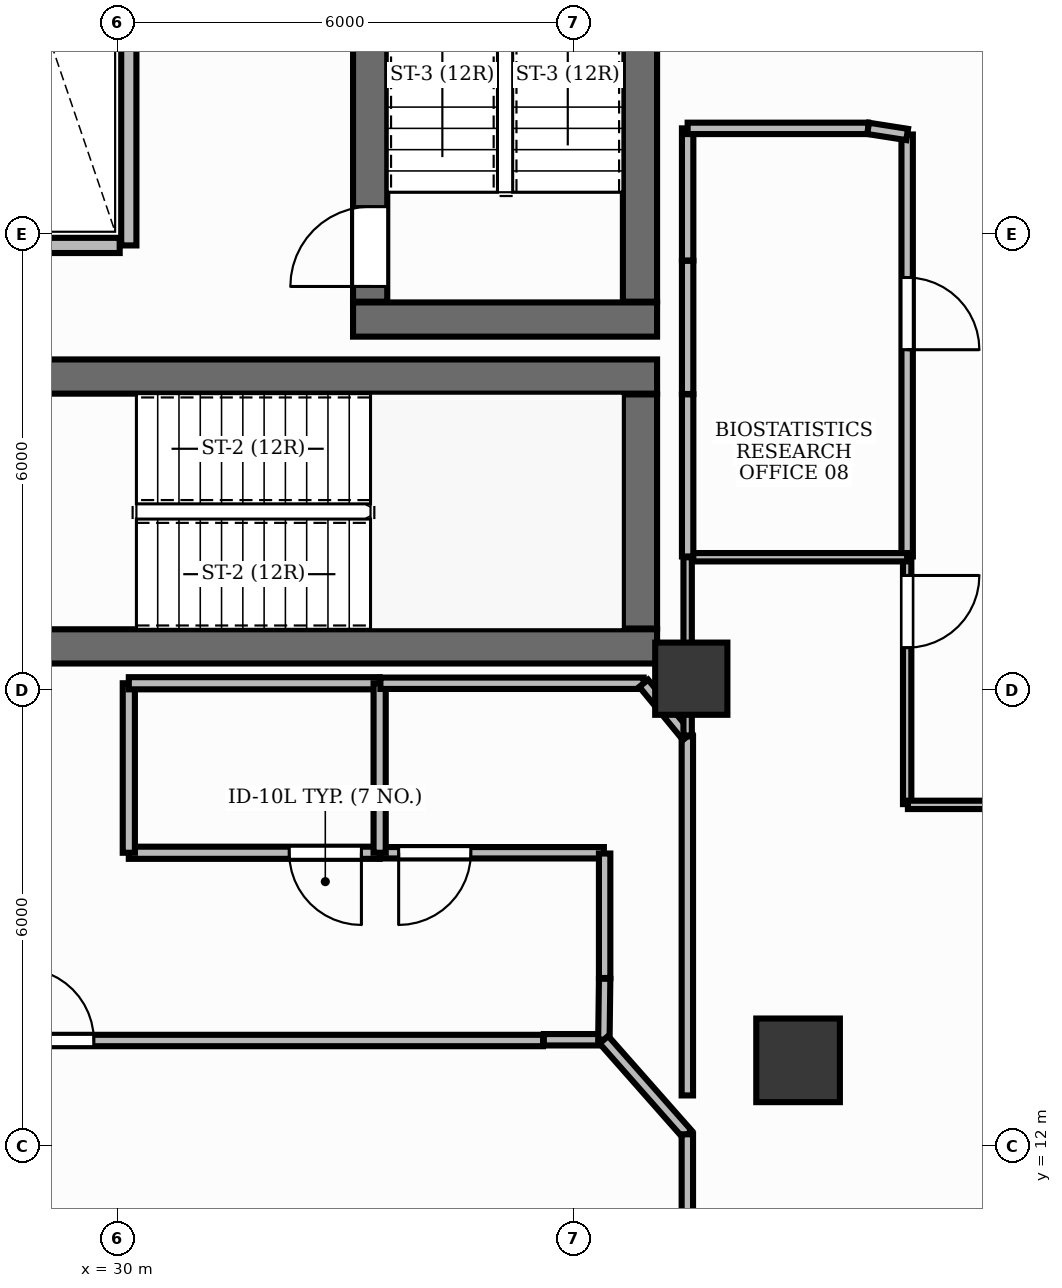
"""IFC4 building model, lengths in metres.
Left out: names, types, materials, properties, quantities, classifications, styles, units other than length and angle.
Written with IfcOpenShell. Run it as: python <this file> out.ifc"""

import sys

from ifc_helpers import new_model, si_unit, direction, frame, frame_2d, origin, origin_2d, place, context, subcontext, project, spatial, rectangle, extrude, element, fill, save


model = new_model("IFC4")
c1 = context("Model", 3, precision=1e-05, world=origin(), true_north=direction((0.0, 1.0)))
c2 = subcontext(c1, "Body", "Model", "MODEL_VIEW")
j1 = project(units=[si_unit("LENGTHUNIT", "METRE"), si_unit("PLANEANGLEUNIT", "RADIAN")], contexts=[c1])
p1 = place(None, origin())
s1 = spatial("IfcSite", under=j1, at=p1, CompositionType="ELEMENT")
p2 = place(p1, origin())
s2 = spatial("IfcBuilding", under=s1, at=p2, CompositionType="ELEMENT")
p3 = place(p2, frame((0.0, 0.0, 115.2)))
s3 = spatial("IfcBuildingStorey", under=s2, at=p3, CompositionType="ELEMENT", Elevation=115.2)
p4 = place(p3, frame((28.852, 18.575, 0.0), z_axis=(0.0, 0.0, 1.0), x_axis=(1.0, 0.0, 0.0)))
e1 = element("IfcWall", 1, at=p4, inside=s3, PredefinedType="SHEAR", context=c2, shape_type="SweptSolid", body=[
    extrude(rectangle(XDim=8.248, YDim=0.45, at=frame_2d((4.124, 0.0))), origin(), (0.0, 0.0, 1.0), 3.9),
])
p5 = place(p3, frame((28.35, 22.125, 0.0), z_axis=(0.0, 0.0, 1.0), x_axis=(1.0, 0.0, 0.0)))
e2 = element("IfcWall", 2, at=p5, inside=s3, PredefinedType="SHEAR", context=c2, shape_type="SweptSolid", body=[
    extrude(rectangle(XDim=8.75, YDim=0.45, at=frame_2d((4.375, 0.0))), origin(), (0.0, 0.0, 1.0), 3.9),
])
p6 = place(p3, frame((36.875, 18.81, 0.0), z_axis=(0.0, 0.0, 1.0), x_axis=(0.0, 1.0, 0.0)))
e3 = element("IfcWall", 3, at=p6, inside=s3, PredefinedType="SHEAR", context=c2, shape_type="SweptSolid", body=[
    extrude(rectangle(XDim=3.08, YDim=0.45, at=frame_2d((1.54, 0.0))), origin(), (0.0, 0.0, 1.0), 3.9),
])
p7 = place(p3, frame((33.1, 22.875, 0.0), z_axis=(0.0, 0.0, 1.0), x_axis=(1.0, 0.0, 0.0)))
e4 = element("IfcWall", 4, at=p7, inside=s3, PredefinedType="SHEAR", context=c2, shape_type="SweptSolid", body=[
    extrude(rectangle(XDim=4.0, YDim=0.45, at=frame_2d((2.0, 0.0))), origin(), (0.0, 0.0, 1.0), 3.9),
])
p8 = place(p3, frame((36.875, 23.11, 0.0), z_axis=(0.0, 0.0, 1.0), x_axis=(0.0, 1.0, 0.0)))
e5 = element("IfcWall", 5, at=p8, inside=s3, PredefinedType="SHEAR", context=c2, shape_type="SweptSolid", body=[
    extrude(rectangle(XDim=7.78, YDim=0.45, at=frame_2d((3.89, 0.0))), origin(), (0.0, 0.0, 1.0), 3.9),
])
p9 = place(p3, frame((33.325, 23.11, 0.0), z_axis=(0.0, 0.0, 1.0), x_axis=(0.0, 1.0, 0.0)))
e6 = element("IfcWall", 6, at=p9, inside=s3, PredefinedType="SHEAR", context=c2, shape_type="SweptSolid", body=[
    extrude(rectangle(XDim=7.78, YDim=0.45, at=frame_2d((3.89, 0.0))), origin(), (0.0, 0.0, 1.0), 3.9),
])
p10 = place(p9, frame((0.2, 0.0, 0.0)))
e7 = element("IfcOpeningElement", 7, at=p10, cuts=e6, PredefinedType="OPENING", context=c2, shape_type="SweptSolid", body=[
    extrude(rectangle(XDim=1.05, YDim=2.15, at=frame_2d((0.525, 1.075))), frame((0.0, 0.24, 0.0), z_axis=(0.0, -1.0, 0.0), x_axis=(1.0, 0.0, 0.0)), (0.0, 0.0, 1.0), 0.48),
])
p11 = place(p3, frame((37.55, 18.15, -0.0), z_axis=(0.0, 0.0, 1.0), x_axis=(1.0, 0.0, 0.0)))
e8 = element("IfcColumn", 8, at=p11, inside=s3, PredefinedType="PILASTER", context=c2, shape_type="SweptSolid", body=[
    extrude(rectangle(XDim=0.95, YDim=0.95, at=origin_2d()), origin(), (0.0, 0.0, 1.0), 3.901),
])
p12 = place(p3, frame((38.955, 13.129, -0.0), z_axis=(0.0, 0.0, 1.0), x_axis=(1.0, 0.0, 0.0)))
e9 = element("IfcColumn", 9, at=p12, inside=s3, PredefinedType="COLUMN", context=c2, shape_type="SweptSolid", body=[
    extrude(rectangle(XDim=1.1, YDim=1.1, at=origin_2d()), origin(), (0.0, 0.0, 1.0), 3.901),
])
p13 = place(p3, frame((30.15, 23.85, 0.0), z_axis=(0.0, 0.0, 1.0), x_axis=(0.0, 1.0, 0.0)))
e10 = element("IfcWall", 10, at=p13, inside=s3, PredefinedType="PARTITIONING", context=c2, shape_type="SweptSolid", body=[
    extrude(rectangle(XDim=6.35, YDim=0.2, at=frame_2d((3.175, 0.0))), origin(), (0.0, 0.0, 1.0), 2.91),
])
p14 = place(p3, frame((27.934, 23.85, 0.0), z_axis=(0.0, 0.0, 1.0), x_axis=(1.0, 0.0, 0.0)))
e11 = element("IfcWall", 11, at=p14, inside=s3, PredefinedType="PARTITIONING", context=c2, shape_type="SweptSolid", body=[
    extrude(rectangle(XDim=2.096, YDim=0.2, at=frame_2d((1.048, 0.0))), origin(), (0.0, 0.0, 1.0), 2.91),
])
p15 = place(p3, frame((33.45, 15.86, 0.0), z_axis=(0.0, 0.0, 1.0), x_axis=(-1.0, 0.0, 0.0)))
e12 = element("IfcWall", 12, at=p15, inside=s3, PredefinedType="PARTITIONING", context=c2, shape_type="SweptSolid", body=[
    extrude(rectangle(XDim=3.3, YDim=0.16, at=frame_2d((1.65, 0.0))), origin(), (0.0, 0.0, 1.0), 2.91),
])
p16 = place(p15, frame((0.24, 0.0, 0.0)))
e13 = element("IfcOpeningElement", 13, at=p16, cuts=e12, PredefinedType="OPENING", context=c2, shape_type="SweptSolid", body=[
    extrude(rectangle(XDim=0.95, YDim=2.15, at=frame_2d((0.475, 1.075))), frame((0.0, 0.095, 0.0), z_axis=(0.0, -1.0, 0.0), x_axis=(1.0, 0.0, 0.0)), (0.0, 0.0, 1.0), 0.19),
])
p17 = place(p3, frame((28.5, 13.39, 0.0), z_axis=(0.0, 0.0, 1.0), x_axis=(1.0, 0.0, 0.0)))
e14 = element("IfcWall", 14, at=p17, inside=s3, PredefinedType="PARTITIONING", context=c2, shape_type="SweptSolid", body=[
    extrude(rectangle(XDim=7.1, YDim=0.15, at=frame_2d((3.55, 0.0))), origin(), (0.0, 0.0, 1.0), 2.91),
])
p18 = place(p17, frame((0.24, 0.0, 0.0)))
e15 = element("IfcOpeningElement", 15, at=p18, cuts=e14, PredefinedType="OPENING", context=c2, shape_type="SweptSolid", body=[
    extrude(rectangle(XDim=0.95, YDim=2.15, at=frame_2d((0.475, 1.075))), frame((0.0, 0.09, 0.0), z_axis=(0.0, -1.0, 0.0), x_axis=(1.0, 0.0, 0.0)), (0.0, 0.0, 1.0), 0.18),
])
p19 = place(p3, frame((36.4, 15.86, 0.0), z_axis=(0.0, 0.0, 1.0), x_axis=(-1.0, 0.0, 0.0)))
e16 = element("IfcWall", 16, at=p19, inside=s3, PredefinedType="PARTITIONING", context=c2, shape_type="SweptSolid", body=[
    extrude(rectangle(XDim=2.94, YDim=0.15, at=frame_2d((1.47, 0.0))), origin(), (0.0, 0.0, 1.0), 2.91),
])
p20 = place(p19, frame((1.75, 0.0, 0.0)))
e17 = element("IfcOpeningElement", 17, at=p20, cuts=e16, PredefinedType="OPENING", context=c2, shape_type="SweptSolid", body=[
    extrude(rectangle(XDim=0.95, YDim=2.15, at=frame_2d((0.475, 1.075))), frame((0.0, 0.09, 0.0), z_axis=(0.0, -1.0, 0.0), x_axis=(1.0, 0.0, 0.0)), (0.0, 0.0, 1.0), 0.18),
])
p21 = place(p3, frame((40.39, 19.748, 0.0), z_axis=(0.0, 0.0, 1.0), x_axis=(0.0, -1.0, 0.0)))
e18 = element("IfcWall", 18, at=p21, inside=s3, PredefinedType="MOVABLE", context=c2, shape_type="SweptSolid", body=[
    extrude(rectangle(XDim=3.248, YDim=0.11, at=frame_2d((1.624, 0.0))), origin(), (0.0, 0.0, 1.0), 2.91),
])
p22 = place(p21, frame((0.24, 0.0, 0.0)))
e19 = element("IfcOpeningElement", 19, at=p22, cuts=e18, PredefinedType="OPENING", context=c2, shape_type="SweptSolid", body=[
    extrude(rectangle(XDim=0.95, YDim=2.15, at=frame_2d((0.475, 1.075))), frame((0.0, 0.07, 0.0), z_axis=(0.0, -1.0, 0.0), x_axis=(1.0, 0.0, 0.0)), (0.0, 0.0, 1.0), 0.14),
])
p23 = place(p3, frame((40.39, 25.31, 0.0), z_axis=(0.0, 0.0, 1.0), x_axis=(0.0, -1.0, 0.0)))
e20 = element("IfcWall", 20, at=p23, inside=s3, PredefinedType="PARTITIONING", context=c2, shape_type="SweptSolid", body=[
    extrude(rectangle(XDim=5.552, YDim=0.15, at=frame_2d((2.776, 0.0))), origin(), (0.0, 0.0, 1.0), 2.91),
])
p24 = place(p23, frame((1.882, 0.0, 0.0)))
e21 = element("IfcOpeningElement", 21, at=p24, cuts=e20, PredefinedType="OPENING", context=c2, shape_type="SweptSolid", body=[
    extrude(rectangle(XDim=0.95, YDim=2.15, at=frame_2d((0.475, 1.075))), frame((0.0, 0.09, 0.0), z_axis=(0.0, -1.0, 0.0), x_axis=(1.0, 0.0, 0.0)), (0.0, 0.0, 1.0), 0.18),
])
p25 = place(p3, frame((30.15, 15.86, 0.0), z_axis=(0.0, 0.0, 1.0), x_axis=(0.0, 1.0, 0.0)))
e22 = element("IfcWall", 22, at=p25, inside=s3, PredefinedType="PARTITIONING", context=c2, shape_type="SweptSolid", body=[
    extrude(rectangle(XDim=2.23, YDim=0.16, at=frame_2d((1.115, 0.0))), origin(), (0.0, 0.0, 1.0), 2.91),
])
p26 = place(p3, frame((30.15, 18.09, 0.0), z_axis=(0.0, 0.0, 1.0), x_axis=(1.0, 0.0, 0.0)))
e23 = element("IfcWall", 23, at=p26, inside=s3, PredefinedType="PARTITIONING", context=c2, shape_type="SweptSolid", body=[
    extrude(rectangle(XDim=3.3, YDim=0.16, at=frame_2d((1.65, 0.0))), origin(), (0.0, 0.0, 1.0), 2.91),
])
p27 = place(p3, frame((33.45, 18.09, 0.0), z_axis=(0.0, 0.0, 1.0), x_axis=(0.0, -1.0, 0.0)))
e24 = element("IfcWall", 24, at=p27, inside=s3, PredefinedType="PARTITIONING", context=c2, shape_type="SweptSolid", body=[
    extrude(rectangle(XDim=2.23, YDim=0.16, at=frame_2d((1.115, 0.0))), origin(), (0.0, 0.0, 1.0), 2.91),
])
p28 = place(p3, frame((35.61, 13.4, 0.0), z_axis=(0.0, 0.0, 1.0), x_axis=(1.0, 0.0, 0.0)))
e25 = element("IfcWall", 25, at=p28, inside=s3, PredefinedType="PARTITIONING", context=c2, shape_type="SweptSolid", body=[
    extrude(rectangle(XDim=0.79, YDim=0.15, at=frame_2d((0.395, 0.0))), origin(), (0.0, 0.0, 1.0), 2.91),
])
p29 = place(p3, frame((36.4, 13.4, 0.0), z_axis=(0.0, 0.0, 1.0), x_axis=(0.012472409758, 0.999922216472, 0.0)))
e26 = element("IfcWall", 26, at=p29, inside=s3, PredefinedType="PARTITIONING", context=c2, shape_type="SweptSolid", body=[
    extrude(rectangle(XDim=0.802, YDim=0.15, at=frame_2d((0.401, 0.0))), origin(), (0.0, 0.0, 1.0), 2.91),
])
p30 = place(p3, frame((36.4, 13.4, 0.0), z_axis=(0.0, 0.0, 1.0), x_axis=(0.661894141329, -0.74959732235, 0.0)))
e27 = element("IfcWall", 27, at=p30, inside=s3, PredefinedType="PARTITIONING", context=c2, shape_type="SweptSolid", body=[
    extrude(rectangle(XDim=1.659, YDim=0.15, at=frame_2d((0.83, 0.0))), origin(), (0.0, 0.0, 1.0), 2.91),
])
p31 = place(p3, frame((37.498, 12.156, 0.0), z_axis=(0.0, 0.0, 1.0), x_axis=(0.0, -1.0, 0.0)))
e28 = element("IfcWall", 28, at=p31, inside=s3, PredefinedType="PARTITIONING", context=c2, shape_type="SweptSolid", body=[
    extrude(rectangle(XDim=6.943, YDim=0.15, at=frame_2d((3.472, 0.0))), origin(), (0.0, 0.0, 1.0), 2.91),
])
p32 = place(p3, frame((37.498, 17.391, 0.0), z_axis=(0.0, 0.0, 1.0), x_axis=(0.0, -1.0, 0.0)))
e29 = element("IfcWall", 29, at=p32, inside=s3, PredefinedType="PARTITIONING", context=c2, shape_type="SweptSolid", body=[
    extrude(rectangle(XDim=4.723, YDim=0.15, at=frame_2d((2.362, 0.0))), origin(), (0.0, 0.0, 1.0), 2.91),
])
p33 = place(p3, frame((36.41, 14.212, 0.0), z_axis=(0.0, 0.0, 1.0), x_axis=(0.0, 1.0, 0.0)))
e30 = element("IfcWall", 30, at=p33, inside=s3, PredefinedType="PARTITIONING", context=c2, shape_type="SweptSolid", body=[
    extrude(rectangle(XDim=1.638, YDim=0.15, at=frame_2d((0.819, 0.0))), origin(), (0.0, 0.0, 1.0), 2.91),
])
p34 = place(p3, frame((33.46, 18.09, 0.0), z_axis=(0.0, 0.0, 1.0), x_axis=(1.0, 0.0, 0.0)))
e31 = element("IfcWall", 31, at=p34, inside=s3, PredefinedType="PARTITIONING", context=c2, shape_type="SweptSolid", body=[
    extrude(rectangle(XDim=3.464, YDim=0.15, at=frame_2d((1.732, 0.0))), origin(), (0.0, 0.0, 1.0), 2.91),
])
p35 = place(p3, frame((36.924, 18.09, 0.0), z_axis=(0.0, 0.0, 1.0), x_axis=(0.634618530508, -0.772825543532, 0.0)))
e32 = element("IfcWall", 32, at=p35, inside=s3, PredefinedType="PARTITIONING", context=c2, shape_type="SweptSolid", body=[
    extrude(rectangle(XDim=0.905, YDim=0.15, at=frame_2d((0.452, 0.0))), origin(), (0.0, 0.0, 1.0), 2.91),
])
p36 = place(p3, frame((37.502, 19.748, 0.0), z_axis=(0.0, 0.0, 1.0), x_axis=(1.0, 0.0, 0.0)))
e33 = element("IfcWall", 33, at=p36, inside=s3, PredefinedType="MOVABLE", context=c2, shape_type="SweptSolid", body=[
    extrude(rectangle(XDim=2.888, YDim=0.11, at=frame_2d((1.444, 0.0))), origin(), (0.0, 0.0, 1.0), 2.91),
])
p37 = place(p3, frame((40.4, 16.49, 0.0), z_axis=(0.0, 0.0, 1.0), x_axis=(1.0, 0.0, 0.0)))
e34 = element("IfcWall", 34, at=p37, inside=s3, PredefinedType="MOVABLE", context=c2, shape_type="SweptSolid", body=[
    extrude(rectangle(XDim=3.8, YDim=0.11, at=frame_2d((1.9, 0.0))), origin(), (0.0, 0.0, 1.0), 2.91),
])
p38 = place(p3, frame((37.502, 17.402, 0.0), z_axis=(0.0, 0.0, 1.0), x_axis=(0.0, 1.0, 0.0)))
e35 = element("IfcWall", 35, at=p38, inside=s3, PredefinedType="MOVABLE", context=c2, shape_type="SweptSolid", body=[
    extrude(rectangle(XDim=2.346, YDim=0.11, at=frame_2d((1.173, 0.0))), origin(), (0.0, 0.0, 1.0), 2.91),
])
p39 = place(p3, frame((37.502, 21.896, 0.0), z_axis=(0.0, 0.0, 1.0), x_axis=(0.0, 1.0, 0.0)))
e36 = element("IfcWall", 36, at=p39, inside=s3, PredefinedType="PARTITIONING", context=c2, shape_type="SweptSolid", body=[
    extrude(rectangle(XDim=1.752, YDim=0.15, at=frame_2d((0.876, 0.0))), origin(), (0.0, 0.0, 1.0), 2.91),
])
p40 = place(p3, frame((37.502, 23.652, 0.0), z_axis=(0.0, 0.0, 1.0), x_axis=(0.0, 1.0, 0.0)))
e37 = element("IfcWall", 37, at=p40, inside=s3, PredefinedType="PARTITIONING", context=c2, shape_type="SweptSolid", body=[
    extrude(rectangle(XDim=1.738, YDim=0.15, at=frame_2d((0.869, 0.0))), origin(), (0.0, 0.0, 1.0), 2.91),
])
p41 = place(p3, frame((37.502, 25.39, 0.0), z_axis=(0.0, 0.0, 1.0), x_axis=(1.0, 0.0, 0.0)))
e38 = element("IfcWall", 38, at=p41, inside=s3, PredefinedType="PARTITIONING", context=c2, shape_type="SweptSolid", body=[
    extrude(rectangle(XDim=2.374, YDim=0.15, at=frame_2d((1.187, 0.0))), origin(), (0.0, 0.0, 1.0), 2.91),
])
p42 = place(p3, frame((39.876, 25.39, 0.0), z_axis=(0.0, 0.0, 1.0), x_axis=(0.988005321265, -0.15441983406, 0.0)))
e39 = element("IfcWall", 39, at=p42, inside=s3, PredefinedType="PARTITIONING", context=c2, shape_type="SweptSolid", body=[
    extrude(rectangle(XDim=0.52, YDim=0.15, at=frame_2d((0.26, 0.0))), origin(), (0.0, 0.0, 1.0), 2.91),
])
p43 = place(p3, frame((37.502, 19.758, 0.0), z_axis=(0.0, 0.0, 1.0), x_axis=(0.0, 1.0, 0.0)))
e40 = element("IfcWall", 40, at=p43, inside=s3, PredefinedType="PARTITIONING", context=c2, shape_type="SweptSolid", body=[
    extrude(rectangle(XDim=2.132, YDim=0.15, at=frame_2d((1.066, 0.0))), origin(), (0.0, 0.0, 1.0), 2.91),
])
p44 = place(p10, origin())
e41 = element("IfcDoor", 41, at=p44, inside=s3, OperationType="SINGLE_SWING_LEFT", PredefinedType="DOOR", context=c2, shape_type="SweptSolid", body=[
    extrude(rectangle(XDim=1.05, YDim=2.15, at=frame_2d((0.525, 1.075))), frame((0.0, 0.025, 0.0), z_axis=(0.0, -1.0, 0.0), x_axis=(1.0, 0.0, 0.0)), (0.0, 0.0, 1.0), 0.05),
])
fill(e7, e41)
p45 = place(p16, origin())
e42 = element("IfcDoor", 42, at=p45, inside=s3, OperationType="SINGLE_SWING_LEFT", PredefinedType="DOOR", context=c2, shape_type="SweptSolid", body=[
    extrude(rectangle(XDim=0.95, YDim=2.15, at=frame_2d((0.475, 1.075))), frame((0.0, 0.025, 0.0), z_axis=(0.0, -1.0, 0.0), x_axis=(1.0, 0.0, 0.0)), (0.0, 0.0, 1.0), 0.05),
])
fill(e13, e42)
p46 = place(p18, origin())
e43 = element("IfcDoor", 43, at=p46, inside=s3, OperationType="SINGLE_SWING_LEFT", PredefinedType="DOOR", context=c2, shape_type="SweptSolid", body=[
    extrude(rectangle(XDim=0.95, YDim=2.15, at=frame_2d((0.475, 1.075))), frame((0.0, 0.025, 0.0), z_axis=(0.0, -1.0, 0.0), x_axis=(1.0, 0.0, 0.0)), (0.0, 0.0, 1.0), 0.05),
])
fill(e15, e43)
p47 = place(p20, origin())
e44 = element("IfcDoor", 44, at=p47, inside=s3, OperationType="SINGLE_SWING_RIGHT", PredefinedType="DOOR", context=c2, shape_type="SweptSolid", body=[
    extrude(rectangle(XDim=0.95, YDim=2.15, at=frame_2d((0.475, 1.075))), frame((0.0, 0.025, 0.0), z_axis=(0.0, -1.0, 0.0), x_axis=(1.0, 0.0, 0.0)), (0.0, 0.0, 1.0), 0.05),
])
fill(e17, e44)
p48 = place(p22, origin())
e45 = element("IfcDoor", 45, at=p48, inside=s3, OperationType="SINGLE_SWING_LEFT", PredefinedType="DOOR", context=c2, shape_type="SweptSolid", body=[
    extrude(rectangle(XDim=0.95, YDim=2.15, at=frame_2d((0.475, 1.075))), frame((0.0, 0.025, 0.0), z_axis=(0.0, -1.0, 0.0), x_axis=(1.0, 0.0, 0.0)), (0.0, 0.0, 1.0), 0.05),
])
fill(e19, e45)
p49 = place(p24, origin())
e46 = element("IfcDoor", 46, at=p49, inside=s3, OperationType="SINGLE_SWING_RIGHT", PredefinedType="DOOR", context=c2, shape_type="SweptSolid", body=[
    extrude(rectangle(XDim=0.95, YDim=2.15, at=frame_2d((0.475, 1.075))), frame((0.0, 0.025, 0.0), z_axis=(0.0, -1.0, 0.0), x_axis=(1.0, 0.0, 0.0)), (0.0, 0.0, 1.0), 0.05),
])
fill(e21, e46)
save(model, sys.argv[1])
